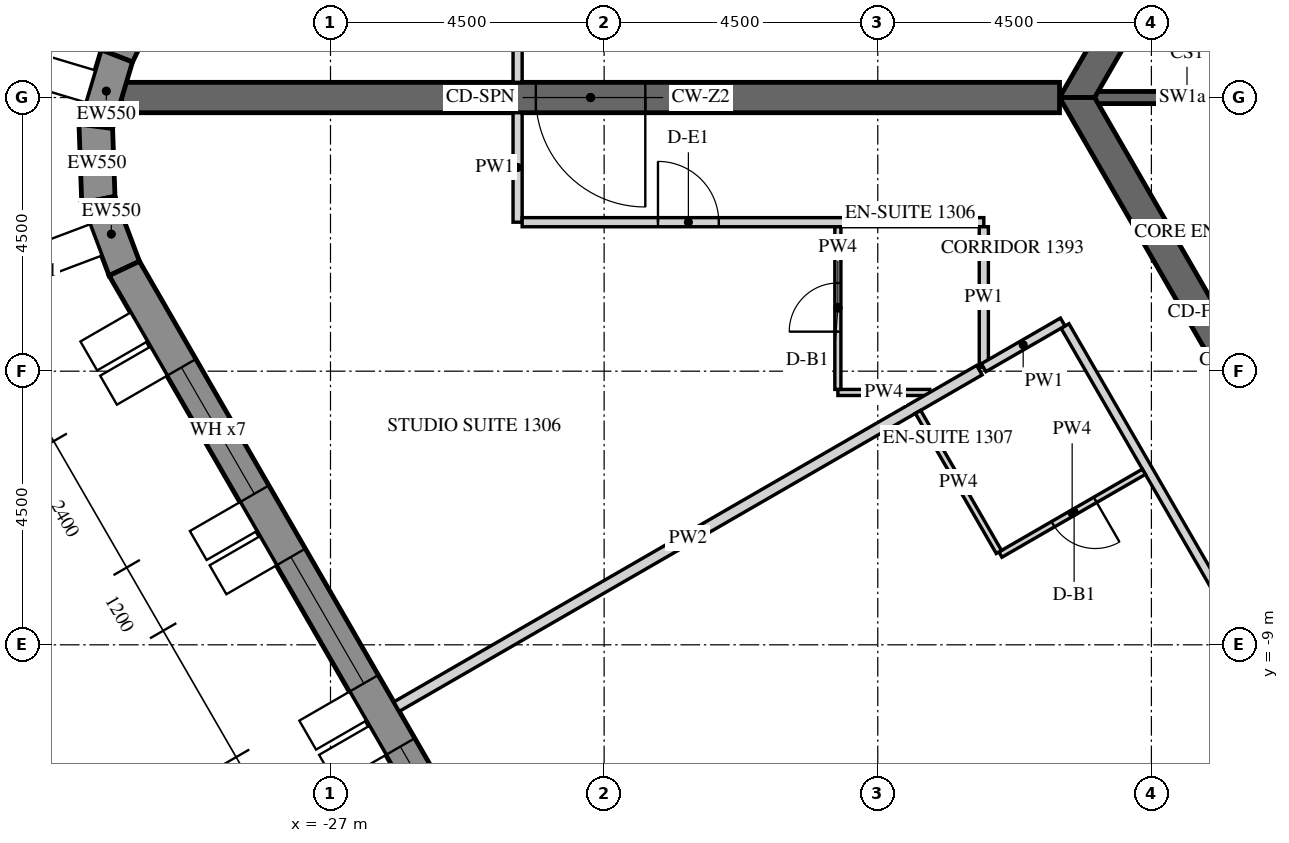
"""IFC4 building model, lengths in metres.
Left out: names, types, materials, properties, quantities, classifications, styles, units other than length and angle.
Written with IfcOpenShell. Run it as: python <this file> out.ifc"""

import sys

from ifc_helpers import new_model, si_unit, direction, frame, frame_2d, origin, place, context, subcontext, project, spatial, polyline, rectangle, outline, extrude, element, fill, save


model = new_model("IFC4")
c1 = context("Model", 3, precision=1e-05, world=origin(), true_north=direction((0.0, 1.0)))
c2 = subcontext(c1, "Body", "Model", "MODEL_VIEW")
j1 = project(units=[si_unit("LENGTHUNIT", "METRE"), si_unit("PLANEANGLEUNIT", "RADIAN")], contexts=[c1])
p1 = place(None, origin())
s1 = spatial("IfcSite", under=j1, at=p1, CompositionType="ELEMENT")
p2 = place(p1, origin())
s2 = spatial("IfcBuilding", under=s1, at=p2, CompositionType="ELEMENT")
p3 = place(p2, frame((0.0, 0.0, 176.1)))
s3 = spatial("IfcBuildingStorey", under=s2, at=p3, CompositionType="ELEMENT", Elevation=176.1)
p4 = place(p3, frame((-18.345, 25.633, -0.15), z_axis=(0.0, 0.0, 1.0), x_axis=(-0.43837181828, -0.898793718791, 0.0)))
e1 = element("IfcWall", 1, at=p4, inside=s3, PredefinedType="SOLIDWALL", context=c2, shape_type="SweptSolid", body=[
    extrude(outline(polyline([(-0.026, -0.275), (27.78, -0.275), (27.735, 0.275), (0.026, 0.275), (-0.026, -0.275)])), origin(), (0.0, 0.0, 1.0), 3.9),
])
p5 = place(p4, frame((1.879, 0.0, 1.05)))
e2 = element("IfcOpeningElement", 2, at=p5, cuts=e1, PredefinedType="OPENING", context=c2, shape_type="SweptSolid", body=[
    extrude(rectangle(XDim=2.4, YDim=2.4, at=frame_2d((1.2, 1.2))), frame((0.0, 0.285, 0.0), z_axis=(0.0, -1.0, 0.0), x_axis=(1.0, 0.0, 0.0)), (0.0, 0.0, 1.0), 0.57),
])
p6 = place(p4, frame((5.479, 0.0, 1.05)))
e3 = element("IfcOpeningElement", 3, at=p6, cuts=e1, PredefinedType="OPENING", context=c2, shape_type="SweptSolid", body=[
    extrude(rectangle(XDim=2.4, YDim=2.4, at=frame_2d((1.2, 1.2))), frame((0.0, 0.285, 0.0), z_axis=(0.0, -1.0, 0.0), x_axis=(1.0, 0.0, 0.0)), (0.0, 0.0, 1.0), 0.57),
])
p7 = place(p4, frame((9.079, 0.0, 1.05)))
e4 = element("IfcOpeningElement", 4, at=p7, cuts=e1, PredefinedType="OPENING", context=c2, shape_type="SweptSolid", body=[
    extrude(rectangle(XDim=2.4, YDim=2.4, at=frame_2d((1.2, 1.2))), frame((0.0, 0.285, 0.0), z_axis=(0.0, -1.0, 0.0), x_axis=(1.0, 0.0, 0.0)), (0.0, 0.0, 1.0), 0.57),
])
p8 = place(p4, frame((12.679, 0.0, 1.05)))
e5 = element("IfcOpeningElement", 5, at=p8, cuts=e1, PredefinedType="OPENING", context=c2, shape_type="SweptSolid", body=[
    extrude(rectangle(XDim=2.4, YDim=2.4, at=frame_2d((1.2, 1.2))), frame((0.0, 0.285, 0.0), z_axis=(0.0, -1.0, 0.0), x_axis=(1.0, 0.0, 0.0)), (0.0, 0.0, 1.0), 0.57),
])
p9 = place(p4, frame((16.279, 0.0, 1.05)))
e6 = element("IfcOpeningElement", 6, at=p9, cuts=e1, PredefinedType="OPENING", context=c2, shape_type="SweptSolid", body=[
    extrude(rectangle(XDim=2.4, YDim=2.4, at=frame_2d((1.2, 1.2))), frame((0.0, 0.285, 0.0), z_axis=(0.0, -1.0, 0.0), x_axis=(1.0, 0.0, 0.0)), (0.0, 0.0, 1.0), 0.57),
])
p10 = place(p4, frame((19.879, 0.0, 1.05)))
e7 = element("IfcOpeningElement", 7, at=p10, cuts=e1, PredefinedType="OPENING", context=c2, shape_type="SweptSolid", body=[
    extrude(rectangle(XDim=2.4, YDim=2.4, at=frame_2d((1.2, 1.2))), frame((0.0, 0.285, 0.0), z_axis=(0.0, -1.0, 0.0), x_axis=(1.0, 0.0, 0.0)), (0.0, 0.0, 1.0), 0.57),
])
p11 = place(p4, frame((23.479, 0.0, 1.05)))
e8 = element("IfcOpeningElement", 8, at=p11, cuts=e1, PredefinedType="OPENING", context=c2, shape_type="SweptSolid", body=[
    extrude(rectangle(XDim=2.4, YDim=2.4, at=frame_2d((1.2, 1.2))), frame((0.0, 0.285, 0.0), z_axis=(0.0, -1.0, 0.0), x_axis=(1.0, 0.0, 0.0)), (0.0, 0.0, 1.0), 0.57),
])
p12 = place(p3, frame((-30.513, 0.684, -0.15), z_axis=(0.0, 0.0, 1.0), x_axis=(-0.286736058109, -0.958009620505, 0.0)))
e9 = element("IfcWall", 9, at=p12, inside=s3, PredefinedType="SOLIDWALL", context=c2, shape_type="SweptSolid", body=[
    extrude(outline(polyline([(-0.022, -0.275), (1.253, -0.275), (1.163, 0.275), (0.022, 0.275), (-0.022, -0.275)])), origin(), (0.0, 0.0, 1.0), 3.9),
])
p13 = place(p3, frame((-30.86, -0.473, -0.15), z_axis=(0.0, 0.0, 1.0), x_axis=(0.03495638276, -0.999388838893, 0.0)))
e10 = element("IfcWall", 10, at=p13, inside=s3, PredefinedType="SOLIDWALL", context=c2, shape_type="SweptSolid", body=[
    extrude(outline(polyline([(-0.045, -0.275), (1.253, -0.275), (1.163, 0.275), (0.045, 0.275), (-0.045, -0.275)])), origin(), (0.0, 0.0, 1.0), 3.9),
])
p14 = place(p3, frame((-30.817, -1.681, -0.15), z_axis=(0.0, 0.0, 1.0), x_axis=(0.352850303963, -0.935679786569, 0.0)))
e11 = element("IfcWall", 11, at=p14, inside=s3, PredefinedType="SOLIDWALL", context=c2, shape_type="SweptSolid", body=[
    extrude(outline(polyline([(-0.045, -0.275), (1.23, -0.275), (1.186, 0.275), (0.045, 0.275), (-0.045, -0.275)])), origin(), (0.0, 0.0, 1.0), 3.9),
])
p15 = place(p3, frame((-30.391, -2.811, -0.15), z_axis=(0.0, 0.0, 1.0), x_axis=(0.499998569178, -0.866026229868, 0.0)))
e12 = element("IfcWall", 12, at=p15, inside=s3, PredefinedType="SOLIDWALL", context=c2, shape_type="SweptSolid", body=[
    extrude(outline(polyline([(-0.022, -0.275), (27.783, -0.275), (27.732, 0.275), (0.022, 0.275), (-0.022, -0.275)])), origin(), (0.0, 0.0, 1.0), 3.9),
])
p16 = place(p15, frame((1.879, 0.0, 1.05)))
e13 = element("IfcOpeningElement", 13, at=p16, cuts=e12, PredefinedType="OPENING", context=c2, shape_type="SweptSolid", body=[
    extrude(rectangle(XDim=2.4, YDim=2.4, at=frame_2d((1.2, 1.2))), frame((0.0, 0.285, 0.0), z_axis=(0.0, -1.0, 0.0), x_axis=(1.0, 0.0, 0.0)), (0.0, 0.0, 1.0), 0.57),
])
p17 = place(p15, frame((5.479, 0.0, 1.05)))
e14 = element("IfcOpeningElement", 14, at=p17, cuts=e12, PredefinedType="OPENING", context=c2, shape_type="SweptSolid", body=[
    extrude(rectangle(XDim=2.4, YDim=2.4, at=frame_2d((1.2, 1.2))), frame((0.0, 0.285, 0.0), z_axis=(0.0, -1.0, 0.0), x_axis=(1.0, 0.0, 0.0)), (0.0, 0.0, 1.0), 0.57),
])
p18 = place(p15, frame((9.079, 0.0, 1.05)))
e15 = element("IfcOpeningElement", 15, at=p18, cuts=e12, PredefinedType="OPENING", context=c2, shape_type="SweptSolid", body=[
    extrude(rectangle(XDim=2.4, YDim=2.4, at=frame_2d((1.2, 1.2))), frame((0.0, 0.285, 0.0), z_axis=(0.0, -1.0, 0.0), x_axis=(1.0, 0.0, 0.0)), (0.0, 0.0, 1.0), 0.57),
])
p19 = place(p15, frame((12.679, 0.0, 1.05)))
e16 = element("IfcOpeningElement", 16, at=p19, cuts=e12, PredefinedType="OPENING", context=c2, shape_type="SweptSolid", body=[
    extrude(rectangle(XDim=2.4, YDim=2.4, at=frame_2d((1.2, 1.2))), frame((0.0, 0.285, 0.0), z_axis=(0.0, -1.0, 0.0), x_axis=(1.0, 0.0, 0.0)), (0.0, 0.0, 1.0), 0.57),
])
p20 = place(p15, frame((16.279, 0.0, 1.05)))
e17 = element("IfcOpeningElement", 17, at=p20, cuts=e12, PredefinedType="OPENING", context=c2, shape_type="SweptSolid", body=[
    extrude(rectangle(XDim=2.4, YDim=2.4, at=frame_2d((1.2, 1.2))), frame((0.0, 0.285, 0.0), z_axis=(0.0, -1.0, 0.0), x_axis=(1.0, 0.0, 0.0)), (0.0, 0.0, 1.0), 0.57),
])
p21 = place(p15, frame((19.879, 0.0, 1.05)))
e18 = element("IfcOpeningElement", 18, at=p21, cuts=e12, PredefinedType="OPENING", context=c2, shape_type="SweptSolid", body=[
    extrude(rectangle(XDim=2.4, YDim=2.4, at=frame_2d((1.2, 1.2))), frame((0.0, 0.285, 0.0), z_axis=(0.0, -1.0, 0.0), x_axis=(1.0, 0.0, 0.0)), (0.0, 0.0, 1.0), 0.57),
])
p22 = place(p15, frame((23.479, 0.0, 1.05)))
e19 = element("IfcOpeningElement", 19, at=p22, cuts=e12, PredefinedType="OPENING", context=c2, shape_type="SweptSolid", body=[
    extrude(rectangle(XDim=2.4, YDim=2.4, at=frame_2d((1.2, 1.2))), frame((0.0, 0.285, 0.0), z_axis=(0.0, -1.0, 0.0), x_axis=(1.0, 0.0, 0.0)), (0.0, 0.0, 1.0), 0.57),
])
p23 = place(p3, frame((-7.361, 12.75, -0.15), z_axis=(0.0, 0.0, 1.0), x_axis=(-0.50000571537, -0.866022103989, 0.0)))
e20 = element("IfcWall", 20, at=p23, inside=s3, PredefinedType="SHEAR", context=c2, shape_type="SweptSolid", body=[
    extrude(outline(polyline([(-0.144, -0.25), (14.867, -0.25), (14.578, 0.25), (0.144, 0.25), (-0.144, -0.25)])), origin(), (0.0, 0.0, 1.0), 3.9),
])
p24 = place(p23, frame((6.49, 0.0, 0.15)))
e21 = element("IfcOpeningElement", 21, at=p24, cuts=e20, PredefinedType="OPENING", context=c2, shape_type="SweptSolid", body=[
    extrude(rectangle(XDim=1.8, YDim=2.4, at=frame_2d((0.9, 1.2))), frame((0.0, 0.26, 0.0), z_axis=(0.0, -1.0, 0.0), x_axis=(1.0, 0.0, 0.0)), (0.0, 0.0, 1.0), 0.52),
])
p25 = place(p3, frame((-14.722, 0.0, -0.15), z_axis=(0.0, 0.0, 1.0), x_axis=(0.50000571537, -0.866022103989, 0.0)))
e22 = element("IfcWall", 22, at=p25, inside=s3, PredefinedType="SHEAR", context=c2, shape_type="SweptSolid", body=[
    extrude(outline(polyline([(-0.144, -0.25), (14.867, -0.25), (14.578, 0.25), (0.144, 0.25), (-0.144, -0.25)])), origin(), (0.0, 0.0, 1.0), 3.9),
])
p26 = place(p25, frame((6.432, 0.0, 0.15)))
e23 = element("IfcOpeningElement", 23, at=p26, cuts=e22, PredefinedType="OPENING", context=c2, shape_type="SweptSolid", body=[
    extrude(rectangle(XDim=1.8, YDim=2.4, at=frame_2d((0.9, 1.2))), frame((0.0, 0.26, 0.0), z_axis=(0.0, -1.0, 0.0), x_axis=(1.0, 0.0, 0.0)), (0.0, 0.0, 1.0), 0.52),
])
p27 = place(p3, frame((-15.011, 0.0, -0.15), z_axis=(0.0, 0.0, 1.0), x_axis=(-1.0, 0.0, 0.0)))
e24 = element("IfcWall", 24, at=p27, inside=s3, PredefinedType="SHEAR", context=c2, shape_type="SweptSolid", body=[
    extrude(rectangle(XDim=15.424, YDim=0.5, at=frame_2d((7.712, 0.0))), origin(), (0.0, 0.0, 1.0), 3.9),
])
p28 = place(p27, frame((6.812, 0.0, 0.15)))
e25 = element("IfcOpeningElement", 25, at=p28, cuts=e24, PredefinedType="OPENING", context=c2, shape_type="SweptSolid", body=[
    extrude(rectangle(XDim=1.8, YDim=2.4, at=frame_2d((0.9, 1.2))), frame((0.0, 0.26, 0.0), z_axis=(0.0, -1.0, 0.0), x_axis=(1.0, 0.0, 0.0)), (0.0, 0.0, 1.0), 0.52),
])
p29 = place(p3, frame((-11.547, 0.0, -0.15), z_axis=(0.0, 0.0, 1.0), x_axis=(-1.0, 0.0, 0.0)))
e26 = element("IfcWall", 26, at=p29, inside=s3, PredefinedType="SHEAR", context=c2, shape_type="SweptSolid", body=[
    extrude(rectangle(XDim=2.887, YDim=0.2, at=frame_2d((1.443, 0.0))), origin(), (0.0, 0.0, 1.0), 3.9),
])
p30 = place(p3, frame((-23.923, 1.975, 0.0), z_axis=(0.0, 0.0, 1.0), x_axis=(0.0, -1.0, 0.0)))
e27 = element("IfcWall", 27, at=p30, inside=s3, PredefinedType="PARTITIONING", context=c2, shape_type="SweptSolid", body=[
    extrude(rectangle(XDim=1.725, YDim=0.15, at=frame_2d((0.863, 0.0))), origin(), (0.0, 0.0, 1.0), 2.988),
])
p31 = place(p3, frame((-23.923, -0.25, 0.0), z_axis=(0.0, 0.0, 1.0), x_axis=(0.0, -1.0, 0.0)))
e28 = element("IfcWall", 28, at=p31, inside=s3, PredefinedType="PARTITIONING", context=c2, shape_type="SweptSolid", body=[
    extrude(rectangle(XDim=1.8, YDim=0.15, at=frame_2d((0.9, 0.0))), origin(), (0.0, 0.0, 1.0), 2.988),
])
p32 = place(p3, frame((-23.848, -2.05, 0.0), z_axis=(0.0, 0.0, 1.0), x_axis=(1.0, 0.0, 0.0)))
e29 = element("IfcWall", 29, at=p32, inside=s3, PredefinedType="PARTITIONING", context=c2, shape_type="SweptSolid", body=[
    extrude(rectangle(XDim=7.592, YDim=0.15, at=frame_2d((3.796, 0.0))), origin(), (0.0, 0.0, 1.0), 2.988),
])
p33 = place(p32, frame((2.233, 0.0, 0.0)))
e30 = element("IfcOpeningElement", 30, at=p33, cuts=e29, PredefinedType="OPENING", context=c2, shape_type="SweptSolid", body=[
    extrude(rectangle(XDim=1.0, YDim=2.1, at=frame_2d((0.5, 1.05))), frame((0.0, 0.085, 0.0), z_axis=(0.0, -1.0, 0.0), x_axis=(1.0, 0.0, 0.0)), (0.0, 0.0, 1.0), 0.17),
])
p34 = place(p3, frame((-16.256, -2.125, 0.0), z_axis=(0.0, 0.0, 1.0), x_axis=(0.0, -1.0, 0.0)))
e31 = element("IfcWall", 31, at=p34, inside=s3, PredefinedType="PARTITIONING", context=c2, shape_type="SweptSolid", body=[
    extrude(rectangle(XDim=2.316, YDim=0.15, at=frame_2d((1.158, 0.0))), origin(), (0.0, 0.0, 1.0), 2.988),
])
p35 = place(p3, frame((-14.921, -3.757, 0.0), z_axis=(0.0, 0.0, 1.0), x_axis=(0.500001980452, -0.866024260367, 0.0)))
e32 = element("IfcWall", 32, at=p35, inside=s3, PredefinedType="PARTITIONING", context=c2, shape_type="SweptSolid", body=[
    extrude(rectangle(XDim=12.752, YDim=0.15, at=frame_2d((6.376, 0.0))), origin(), (0.0, 0.0, 1.0), 2.988),
])
p36 = place(p35, frame((6.225, 0.0, 0.0)))
e33 = element("IfcOpeningElement", 33, at=p36, cuts=e32, PredefinedType="OPENING", context=c2, shape_type="SweptSolid", body=[
    extrude(rectangle(XDim=1.0, YDim=2.1, at=frame_2d((0.5, 1.05))), frame((0.0, 0.085, 0.0), z_axis=(0.0, -1.0, 0.0), x_axis=(1.0, 0.0, 0.0)), (0.0, 0.0, 1.0), 0.17),
])
p37 = place(p35, frame((11.602, 0.0, 0.0)))
e34 = element("IfcOpeningElement", 34, at=p37, cuts=e32, PredefinedType="OPENING", context=c2, shape_type="SweptSolid", body=[
    extrude(rectangle(XDim=1.0, YDim=2.1, at=frame_2d((0.5, 1.05))), frame((0.0, 0.085, 0.0), z_axis=(0.0, -1.0, 0.0), x_axis=(1.0, 0.0, 0.0)), (0.0, 0.0, 1.0), 0.17),
])
p38 = place(p3, frame((-16.259, -4.443, 0.0), z_axis=(0.0, 0.0, 1.0), x_axis=(0.866004263386, 0.500036614457, 0.0)))
e35 = element("IfcWall", 35, at=p38, inside=s3, PredefinedType="PARTITIONING", context=c2, shape_type="SweptSolid", body=[
    extrude(rectangle(XDim=1.502, YDim=0.15, at=frame_2d((0.751, 0.0))), origin(), (0.0, 0.0, 1.0), 2.988),
])
p39 = place(p3, frame((-17.145, -4.85, 0.0), z_axis=(0.0, 0.0, 1.0), x_axis=(-1.0, 0.0, 0.0)))
e36 = element("IfcWall", 36, at=p39, inside=s3, PredefinedType="PARTITIONING", context=c2, shape_type="SweptSolid", body=[
    extrude(rectangle(XDim=1.511, YDim=0.1, at=frame_2d((0.756, 0.0))), origin(), (0.0, 0.0, 1.0), 2.988),
])
p40 = place(p3, frame((-18.656, -4.8, 0.0), z_axis=(0.0, 0.0, 1.0), x_axis=(0.0, 1.0, 0.0)))
e37 = element("IfcWall", 37, at=p40, inside=s3, PredefinedType="PARTITIONING", context=c2, shape_type="SweptSolid", body=[
    extrude(rectangle(XDim=2.675, YDim=0.1, at=frame_2d((1.337, 0.0))), origin(), (0.0, 0.0, 1.0), 2.988),
])
p41 = place(p40, frame((0.95, 0.0, 0.0)))
e38 = element("IfcOpeningElement", 38, at=p41, cuts=e37, PredefinedType="OPENING", context=c2, shape_type="SweptSolid", body=[
    extrude(rectangle(XDim=0.8, YDim=2.1, at=frame_2d((0.4, 1.05))), frame((0.0, 0.06, 0.0), z_axis=(0.0, -1.0, 0.0), x_axis=(1.0, 0.0, 0.0)), (0.0, 0.0, 1.0), 0.12),
])
p42 = place(p3, frame((-25.914, -10.017, 0.0), z_axis=(0.0, 0.0, 1.0), x_axis=(0.866021744024, 0.500006338837, 0.0)))
e39 = element("IfcWall", 39, at=p42, inside=s3, PredefinedType="PARTITIONING", context=c2, shape_type="SweptSolid", body=[
    extrude(rectangle(XDim=11.067, YDim=0.18, at=frame_2d((5.534, 0.0))), origin(), (0.0, 0.0, 1.0), 2.988),
])
p43 = place(p3, frame((-13.623, -6.154, 0.0), z_axis=(0.0, 0.0, 1.0), x_axis=(-0.866051307416, -0.49995513091, 0.0)))
e40 = element("IfcWall", 40, at=p43, inside=s3, PredefinedType="PARTITIONING", context=c2, shape_type="SweptSolid", body=[
    extrude(rectangle(XDim=2.725, YDim=0.1, at=frame_2d((1.362, 0.0))), origin(), (0.0, 0.0, 1.0), 2.988),
])
p44 = place(p43, frame((0.925, 0.0, 0.0)))
e41 = element("IfcOpeningElement", 41, at=p44, cuts=e40, PredefinedType="OPENING", context=c2, shape_type="SweptSolid", body=[
    extrude(rectangle(XDim=0.8, YDim=2.1, at=frame_2d((0.4, 1.05))), frame((0.0, 0.06, 0.0), z_axis=(0.0, -1.0, 0.0), x_axis=(1.0, 0.0, 0.0)), (0.0, 0.0, 1.0), 0.12),
])
p45 = place(p3, frame((-16.008, -7.473, 0.0), z_axis=(0.0, 0.0, 1.0), x_axis=(-0.500008456887, 0.866020521143, 0.0)))
e42 = element("IfcWall", 42, at=p45, inside=s3, PredefinedType="PARTITIONING", context=c2, shape_type="SweptSolid", body=[
    extrude(rectangle(XDim=2.66, YDim=0.1, at=frame_2d((1.33, 0.0))), origin(), (0.0, 0.0, 1.0), 2.988),
])
p46 = place(p16, frame((0.0, 0.205, 0.0)))
e43 = element("IfcWindow", 43, at=p46, inside=s3, PartitioningType="DOUBLE_PANEL_VERTICAL", PredefinedType="WINDOW", context=c2, shape_type="SweptSolid", body=[
    extrude(rectangle(XDim=2.4, YDim=2.4, at=frame_2d((1.2, 1.2))), frame((0.0, 0.03, 0.0), z_axis=(0.0, -1.0, 0.0), x_axis=(1.0, 0.0, 0.0)), (0.0, 0.0, 1.0), 0.06),
])
fill(e13, e43)
p47 = place(p17, frame((0.0, 0.205, 0.0)))
e44 = element("IfcWindow", 44, at=p47, inside=s3, PartitioningType="DOUBLE_PANEL_VERTICAL", PredefinedType="WINDOW", context=c2, shape_type="SweptSolid", body=[
    extrude(rectangle(XDim=2.4, YDim=2.4, at=frame_2d((1.2, 1.2))), frame((0.0, 0.03, 0.0), z_axis=(0.0, -1.0, 0.0), x_axis=(1.0, 0.0, 0.0)), (0.0, 0.0, 1.0), 0.06),
])
fill(e14, e44)
p48 = place(p18, frame((0.0, 0.205, 0.0)))
e45 = element("IfcWindow", 45, at=p48, inside=s3, PartitioningType="DOUBLE_PANEL_VERTICAL", PredefinedType="WINDOW", context=c2, shape_type="SweptSolid", body=[
    extrude(rectangle(XDim=2.4, YDim=2.4, at=frame_2d((1.2, 1.2))), frame((0.0, 0.03, 0.0), z_axis=(0.0, -1.0, 0.0), x_axis=(1.0, 0.0, 0.0)), (0.0, 0.0, 1.0), 0.06),
])
fill(e15, e45)
p49 = place(p28, origin())
e46 = element("IfcDoor", 46, at=p49, inside=s3, OperationType="DOUBLE_DOOR_SINGLE_SWING", PredefinedType="DOOR", context=c2, shape_type="SweptSolid", body=[
    extrude(rectangle(XDim=1.8, YDim=2.4, at=frame_2d((0.9, 1.2))), frame((0.0, 0.025, 0.0), z_axis=(0.0, -1.0, 0.0), x_axis=(1.0, 0.0, 0.0)), (0.0, 0.0, 1.0), 0.05),
])
fill(e25, e46)
p50 = place(p33, origin())
e47 = element("IfcDoor", 47, at=p50, inside=s3, OperationType="SINGLE_SWING_LEFT", PredefinedType="DOOR", context=c2, shape_type="SweptSolid", body=[
    extrude(rectangle(XDim=1.0, YDim=2.1, at=frame_2d((0.5, 1.05))), frame((0.0, 0.025, 0.0), z_axis=(0.0, -1.0, 0.0), x_axis=(1.0, 0.0, 0.0)), (0.0, 0.0, 1.0), 0.05),
])
fill(e30, e47)
p51 = place(p41, origin())
e48 = element("IfcDoor", 48, at=p51, inside=s3, OperationType="SINGLE_SWING_RIGHT", PredefinedType="DOOR", context=c2, shape_type="SweptSolid", body=[
    extrude(rectangle(XDim=0.8, YDim=2.1, at=frame_2d((0.4, 1.05))), frame((0.0, 0.025, 0.0), z_axis=(0.0, -1.0, 0.0), x_axis=(1.0, 0.0, 0.0)), (0.0, 0.0, 1.0), 0.05),
])
fill(e38, e48)
p52 = place(p44, origin())
e49 = element("IfcDoor", 49, at=p52, inside=s3, OperationType="SINGLE_SWING_RIGHT", PredefinedType="DOOR", context=c2, shape_type="SweptSolid", body=[
    extrude(rectangle(XDim=0.8, YDim=2.1, at=frame_2d((0.4, 1.05))), frame((0.0, 0.025, 0.0), z_axis=(0.0, -1.0, 0.0), x_axis=(1.0, 0.0, 0.0)), (0.0, 0.0, 1.0), 0.05),
])
fill(e41, e49)
save(model, sys.argv[1])
